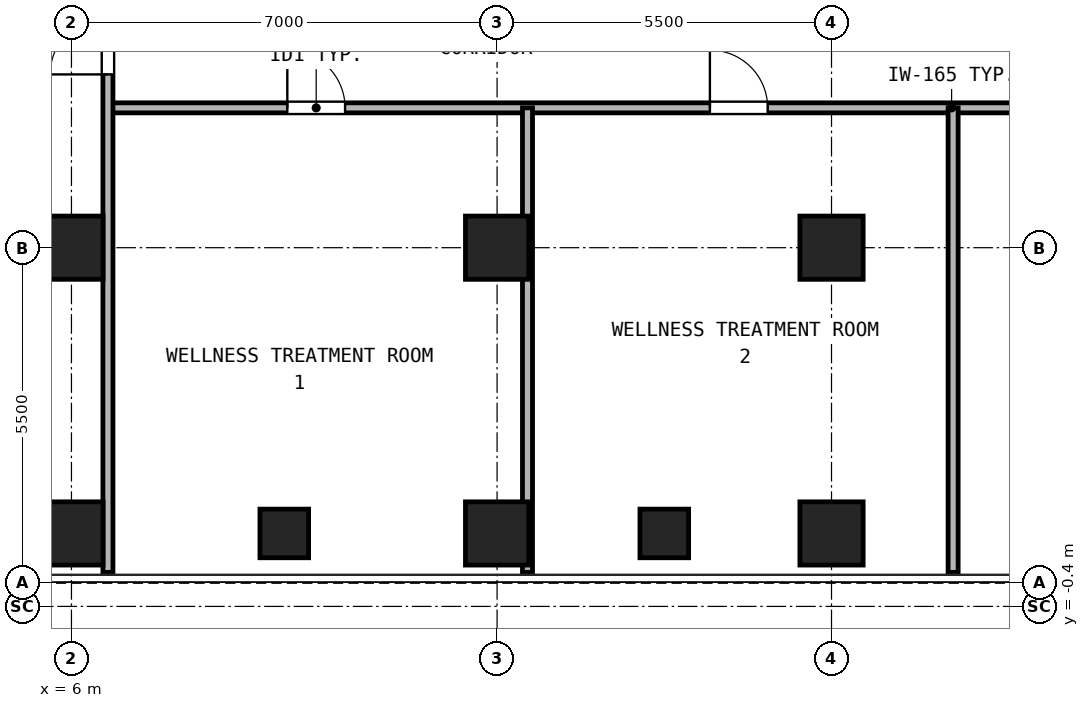
"""IFC4 building model, lengths in metres.
Left out: names, types, materials, properties, quantities, classifications, styles, units other than length and angle.
Written with IfcOpenShell. Run it as: python <this file> out.ifc"""

import sys

from ifc_helpers import new_model, si_unit, direction, frame, frame_2d, origin, origin_2d, place, context, subcontext, project, spatial, rectangle, hollow_rectangle, extrude, source, transform, mapped, element, fill, save


model = new_model("IFC4")
c1 = context("Model", 3, precision=1e-05, world=origin(), true_north=direction((0.0, 1.0)))
c2 = subcontext(c1, "Body", "Model", "MODEL_VIEW")
j1 = project(units=[si_unit("LENGTHUNIT", "METRE"), si_unit("PLANEANGLEUNIT", "RADIAN")], contexts=[c1])
p1 = place(None, origin())
s1 = spatial("IfcSite", under=j1, at=p1, CompositionType="ELEMENT")
p2 = place(p1, origin())
s2 = spatial("IfcBuilding", under=s1, at=p2, CompositionType="ELEMENT")
p3 = place(p2, frame((0.0, 0.0, 84.6)))
s3 = spatial("IfcBuildingStorey", under=s2, at=p3, CompositionType="ELEMENT", Elevation=84.6)
m1 = source(origin(), c2, "Body", "SweptSolid", [
    extrude(hollow_rectangle(XDim=1.04, YDim=1.04, WallThickness=0.065, at=origin_2d()), origin(), (0.0, 0.0, 1.0), 3.24),
])
for number, where, z_axis, x_axis in (
    (1, (6.0, 0.8, 0.0), (0.0, 0.0, 1.0), (1.0, 0.0, 0.0)),
    (2, (13.0, 0.8, 0.0), (0.0, 0.0, 1.0), (1.0, 0.0, 0.0)),
    (3, (18.5, 0.8, 0.0), (0.0, 0.0, 1.0), (1.0, 0.0, 0.0)),
    (4, (6.0, 5.5, 0.0), (0.0, 0.0, 1.0), (1.0, 0.0, 0.0)),
    (5, (13.0, 5.5, 0.0), (0.0, 0.0, 1.0), (1.0, 0.0, 0.0)),
    (6, (18.5, 5.5, 0.0), (0.0, 0.0, 1.0), (1.0, 0.0, 0.0)),
):
    element("IfcColumn", number, at=place(p3, frame(where, z_axis=z_axis, x_axis=x_axis)), inside=s3, PredefinedType="COLUMN", context=c2, shape_type="MappedRepresentation", body=[
        mapped(m1, transform((0.0, 0.0, 0.0), x_axis=(1.0, 0.0, 0.0), y_axis=(0.0, 1.0, 0.0), z_axis=(0.0, 0.0, 1.0), scale=1.0)),
    ])
m2 = source(origin(), c2, "Body", "SweptSolid", [
    extrude(hollow_rectangle(XDim=0.8, YDim=0.8, WallThickness=0.045, at=origin_2d()), origin(), (0.0, 0.0, 1.0), 3.24),
])
for number, where, z_axis, x_axis in (
    (7, (9.5, 0.8, 0.0), (0.0, 0.0, 1.0), (1.0, 0.0, 0.0)),
    (8, (15.75, 0.8, 0.0), (0.0, 0.0, 1.0), (1.0, 0.0, 0.0)),
):
    element("IfcColumn", number, at=place(p3, frame(where, z_axis=z_axis, x_axis=x_axis)), inside=s3, PredefinedType="COLUMN", context=c2, shape_type="MappedRepresentation", body=[
        mapped(m2, transform((0.0, 0.0, 0.0), x_axis=(1.0, 0.0, 0.0), y_axis=(0.0, 1.0, 0.0), z_axis=(0.0, 0.0, 1.0), scale=1.0)),
    ])
p4 = place(p3, frame((6.6, 7.8, 0.0), z_axis=(0.0, 0.0, 1.0), x_axis=(1.0, 0.0, 0.0)))
e9 = element("IfcWall", 9, at=p4, inside=s3, PredefinedType="PARTITIONING", context=c2, shape_type="SweptSolid", body=[
    extrude(rectangle(XDim=33.8, YDim=0.165, at=frame_2d((16.9, 0.0))), origin(), (0.0, 0.0, 1.0), 3.24),
])
p5 = place(p4, frame((2.95, 0.0, 0.0)))
e10 = element("IfcOpeningElement", 10, at=p5, cuts=e9, PredefinedType="OPENING", context=c2, shape_type="SweptSolid", body=[
    extrude(rectangle(XDim=0.95, YDim=2.15, at=frame_2d((0.475, 1.075))), frame((0.0, 0.093, 0.0), z_axis=(0.0, -1.0, 0.0), x_axis=(1.0, 0.0, 0.0)), (0.0, 0.0, 1.0), 0.185),
])
p6 = place(p4, frame((9.9, 0.0, 0.0)))
e11 = element("IfcOpeningElement", 11, at=p6, cuts=e9, PredefinedType="OPENING", context=c2, shape_type="SweptSolid", body=[
    extrude(rectangle(XDim=0.95, YDim=2.15, at=frame_2d((0.475, 1.075))), frame((0.0, 0.093, 0.0), z_axis=(0.0, -1.0, 0.0), x_axis=(1.0, 0.0, 0.0)), (0.0, 0.0, 1.0), 0.185),
])
p7 = place(p4, frame((16.9, 0.0, 0.0)))
e12 = element("IfcOpeningElement", 12, at=p7, cuts=e9, PredefinedType="OPENING", context=c2, shape_type="SweptSolid", body=[
    extrude(rectangle(XDim=0.95, YDim=2.15, at=frame_2d((0.475, 1.075))), frame((0.0, 0.093, 0.0), z_axis=(0.0, -1.0, 0.0), x_axis=(1.0, 0.0, 0.0)), (0.0, 0.0, 1.0), 0.185),
])
p8 = place(p4, frame((23.4, 0.0, 0.0)))
e13 = element("IfcOpeningElement", 13, at=p8, cuts=e9, PredefinedType="OPENING", context=c2, shape_type="SweptSolid", body=[
    extrude(rectangle(XDim=0.95, YDim=2.15, at=frame_2d((0.475, 1.075))), frame((0.0, 0.093, 0.0), z_axis=(0.0, -1.0, 0.0), x_axis=(1.0, 0.0, 0.0)), (0.0, 0.0, 1.0), 0.185),
])
p9 = place(p4, frame((28.25, 0.0, 0.0)))
e14 = element("IfcOpeningElement", 14, at=p9, cuts=e9, PredefinedType="OPENING", context=c2, shape_type="SweptSolid", body=[
    extrude(rectangle(XDim=0.92, YDim=2.1, at=frame_2d((0.46, 1.05))), frame((0.0, 0.093, 0.0), z_axis=(0.0, -1.0, 0.0), x_axis=(1.0, 0.0, 0.0)), (0.0, 0.0, 1.0), 0.185),
])
p10 = place(p4, frame((31.7, 0.0, 0.0)))
e15 = element("IfcOpeningElement", 15, at=p10, cuts=e9, PredefinedType="OPENING", context=c2, shape_type="SweptSolid", body=[
    extrude(rectangle(XDim=0.92, YDim=2.1, at=frame_2d((0.46, 1.05))), frame((0.0, 0.093, 0.0), z_axis=(0.0, -1.0, 0.0), x_axis=(1.0, 0.0, 0.0)), (0.0, 0.0, 1.0), 0.185),
])
p11 = place(p3, frame((6.6, 0.16, 0.0), z_axis=(0.0, 0.0, 1.0), x_axis=(0.0, 1.0, 0.0)))
e16 = element("IfcWall", 16, at=p11, inside=s3, PredefinedType="PARTITIONING", context=c2, shape_type="SweptSolid", body=[
    extrude(rectangle(XDim=40.18, YDim=0.165, at=frame_2d((20.09, 0.0))), origin(), (0.0, 0.0, 1.0), 3.24),
])
p12 = place(p11, frame((8.19, 0.0, 0.0)))
e17 = element("IfcOpeningElement", 17, at=p12, cuts=e16, PredefinedType="OPENING", context=c2, shape_type="SweptSolid", body=[
    extrude(rectangle(XDim=0.95, YDim=2.15, at=frame_2d((0.475, 1.075))), frame((0.0, 0.093, 0.0), z_axis=(0.0, -1.0, 0.0), x_axis=(1.0, 0.0, 0.0)), (0.0, 0.0, 1.0), 0.185),
])
p13 = place(p11, frame((30.24, 0.0, 0.0)))
e18 = element("IfcOpeningElement", 18, at=p13, cuts=e16, PredefinedType="OPENING", context=c2, shape_type="SweptSolid", body=[
    extrude(rectangle(XDim=0.95, YDim=2.15, at=frame_2d((0.475, 1.075))), frame((0.0, 0.093, 0.0), z_axis=(0.0, -1.0, 0.0), x_axis=(1.0, 0.0, 0.0)), (0.0, 0.0, 1.0), 0.185),
])
for number, where, z_axis, x_axis in (
    (19, (13.5, 0.16, 0.0), (0.0, 0.0, 1.0), (0.0, 1.0, 0.0)),
    (20, (20.5, 0.16, 0.0), (0.0, 0.0, 1.0), (0.0, 1.0, 0.0)),
):
    element("IfcWall", number, at=place(p3, frame(where, z_axis=z_axis, x_axis=x_axis)), inside=s3, PredefinedType="PARTITIONING", context=c2, shape_type="SweptSolid", body=[
        extrude(rectangle(XDim=7.64, YDim=0.165, at=frame_2d((3.82, 0.0))), origin(), (0.0, 0.0, 1.0), 3.24),
    ])
p14 = place(p5, frame((0.95, 0.0, 0.0), z_axis=(0.0, 0.0, 1.0), x_axis=(-1.0, 0.0, 0.0)))
e21 = element("IfcDoor", 21, at=p14, inside=s3, OperationType="SINGLE_SWING_LEFT", PredefinedType="DOOR", context=c2, shape_type="SweptSolid", body=[
    extrude(rectangle(XDim=0.95, YDim=2.15, at=frame_2d((0.475, 1.075))), frame((0.0, 0.025, 0.0), z_axis=(0.0, -1.0, 0.0), x_axis=(1.0, 0.0, 0.0)), (0.0, 0.0, 1.0), 0.05),
])
fill(e10, e21)
p15 = place(p6, frame((0.95, 0.0, 0.0), z_axis=(0.0, 0.0, 1.0), x_axis=(-1.0, 0.0, 0.0)))
e22 = element("IfcDoor", 22, at=p15, inside=s3, OperationType="SINGLE_SWING_LEFT", PredefinedType="DOOR", context=c2, shape_type="SweptSolid", body=[
    extrude(rectangle(XDim=0.95, YDim=2.15, at=frame_2d((0.475, 1.075))), frame((0.0, 0.025, 0.0), z_axis=(0.0, -1.0, 0.0), x_axis=(1.0, 0.0, 0.0)), (0.0, 0.0, 1.0), 0.05),
])
fill(e11, e22)
p16 = place(p12, frame((0.95, 0.0, 0.0), z_axis=(0.0, 0.0, 1.0), x_axis=(-1.0, 0.0, 0.0)))
e23 = element("IfcDoor", 23, at=p16, inside=s3, OperationType="SINGLE_SWING_LEFT", PredefinedType="DOOR", context=c2, shape_type="SweptSolid", body=[
    extrude(rectangle(XDim=0.95, YDim=2.15, at=frame_2d((0.475, 1.075))), frame((0.0, 0.025, 0.0), z_axis=(0.0, -1.0, 0.0), x_axis=(1.0, 0.0, 0.0)), (0.0, 0.0, 1.0), 0.05),
])
fill(e17, e23)
save(model, sys.argv[1])
